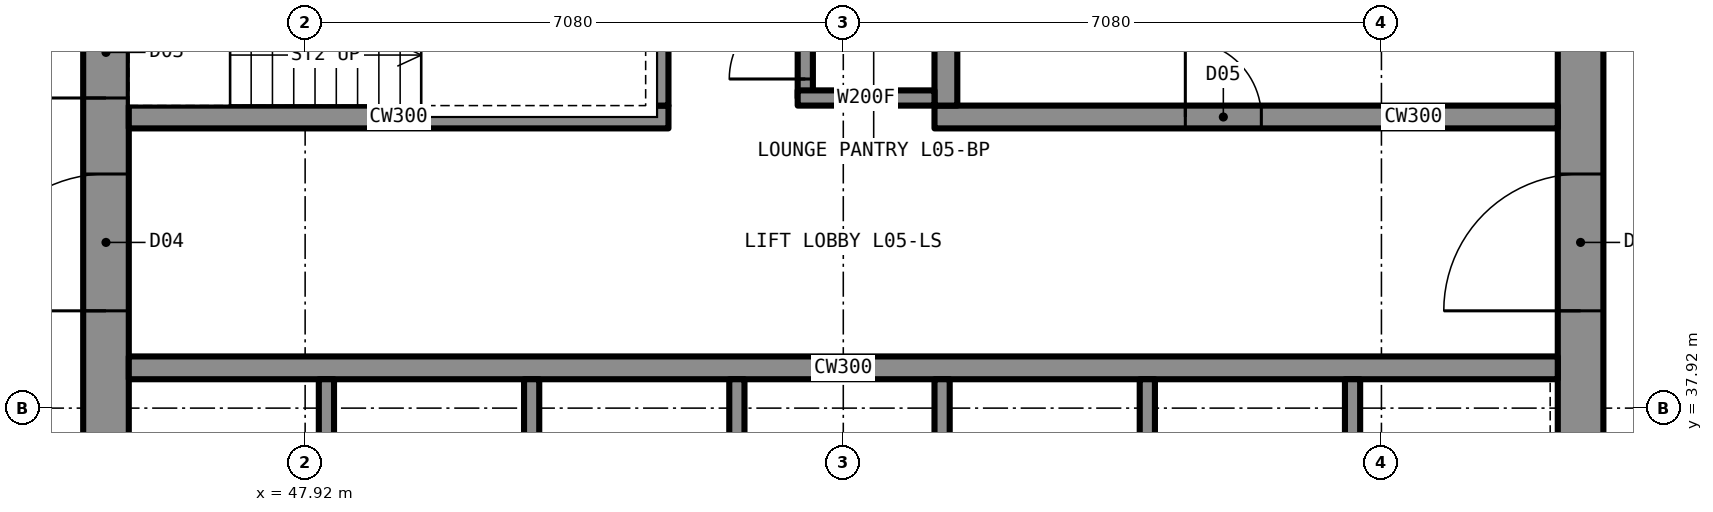
"""IFC4 building model, lengths in metres.
Left out: names, types, materials, properties, quantities, classifications, styles, units other than length and angle.
Written with IfcOpenShell. Run it as: python <this file> out.ifc"""

import sys

from ifc_helpers import new_model, si_unit, direction, frame, frame_2d, origin, place, context, subcontext, project, spatial, rectangle, extrude, element, fill, save


model = new_model("IFC4")
c1 = context("Model", 3, precision=1e-05, world=origin(), true_north=direction((0.0, 1.0)))
c2 = subcontext(c1, "Body", "Model", "MODEL_VIEW")
j1 = project(units=[si_unit("LENGTHUNIT", "METRE"), si_unit("PLANEANGLEUNIT", "RADIAN")], contexts=[c1])
p1 = place(None, origin())
s1 = spatial("IfcSite", under=j1, at=p1, CompositionType="ELEMENT")
p2 = place(p1, origin())
s2 = spatial("IfcBuilding", under=s1, at=p2, CompositionType="ELEMENT")
p3 = place(p2, frame((0.0, 0.0, 25.0)))
s3 = spatial("IfcBuildingStorey", under=s2, at=p3, CompositionType="ELEMENT", Elevation=25.0)
p4 = place(p3, frame((64.7, 35.6, 0.0), z_axis=(0.0, 0.0, 1.0), x_axis=(0.0, 1.0, 0.0)))
e1 = element("IfcWall", 1, at=p4, inside=s3, PredefinedType="SHEAR", context=c2, shape_type="SweptSolid", body=[
    extrude(rectangle(XDim=18.8, YDim=0.6, at=frame_2d((9.4, 0.0))), origin(), (0.0, 0.0, 1.0), 3.5),
])
p5 = place(p4, frame((13.4, 0.0, 0.0)))
e2 = element("IfcOpeningElement", 2, at=p5, cuts=e1, PredefinedType="OPENING", context=c2, shape_type="SweptSolid", body=[
    extrude(rectangle(XDim=1.8, YDim=2.2, at=frame_2d((0.9, 1.1))), frame((0.0, 0.31, 0.0), z_axis=(0.0, -1.0, 0.0), x_axis=(1.0, 0.0, 0.0)), (0.0, 0.0, 1.0), 0.62),
])
p6 = place(p4, frame((3.6, 0.0, 0.0)))
e3 = element("IfcOpeningElement", 3, at=p6, cuts=e1, PredefinedType="OPENING", context=c2, shape_type="SweptSolid", body=[
    extrude(rectangle(XDim=1.8, YDim=2.2, at=frame_2d((0.9, 1.1))), frame((0.0, 0.31, 0.0), z_axis=(0.0, -1.0, 0.0), x_axis=(1.0, 0.0, 0.0)), (0.0, 0.0, 1.0), 0.62),
])
p7 = place(p3, frame((45.3, 35.6, 0.0), z_axis=(0.0, 0.0, 1.0), x_axis=(0.0, 1.0, 0.0)))
e4 = element("IfcWall", 4, at=p7, inside=s3, PredefinedType="SHEAR", context=c2, shape_type="SweptSolid", body=[
    extrude(rectangle(XDim=18.8, YDim=0.6, at=frame_2d((9.4, 0.0))), origin(), (0.0, 0.0, 1.0), 3.5),
])
p8 = place(p7, frame((13.4, 0.0, 0.0)))
e5 = element("IfcOpeningElement", 5, at=p8, cuts=e4, PredefinedType="OPENING", context=c2, shape_type="SweptSolid", body=[
    extrude(rectangle(XDim=1.8, YDim=2.2, at=frame_2d((0.9, 1.1))), frame((0.0, 0.31, 0.0), z_axis=(0.0, -1.0, 0.0), x_axis=(1.0, 0.0, 0.0)), (0.0, 0.0, 1.0), 0.62),
])
p9 = place(p7, frame((3.6, 0.0, 0.0)))
e6 = element("IfcOpeningElement", 6, at=p9, cuts=e4, PredefinedType="OPENING", context=c2, shape_type="SweptSolid", body=[
    extrude(rectangle(XDim=1.8, YDim=2.2, at=frame_2d((0.9, 1.1))), frame((0.0, 0.31, 0.0), z_axis=(0.0, -1.0, 0.0), x_axis=(1.0, 0.0, 0.0)), (0.0, 0.0, 1.0), 0.62),
])
p10 = place(p7, frame((6.4, 0.0, 0.0)))
e7 = element("IfcOpeningElement", 7, at=p10, cuts=e4, PredefinedType="OPENING", context=c2, shape_type="SweptSolid", body=[
    extrude(rectangle(XDim=1.2, YDim=2.2, at=frame_2d((0.6, 1.1))), frame((0.0, 0.31, 0.0), z_axis=(0.0, -1.0, 0.0), x_axis=(1.0, 0.0, 0.0)), (0.0, 0.0, 1.0), 0.62),
])
p11 = place(p3, frame((45.6, 38.45, 0.0), z_axis=(0.0, 0.0, 1.0), x_axis=(1.0, 0.0, 0.0)))
e8 = element("IfcWall", 8, at=p11, inside=s3, PredefinedType="SHEAR", context=c2, shape_type="SweptSolid", body=[
    extrude(rectangle(XDim=18.8, YDim=0.3, at=frame_2d((9.4, 0.0))), origin(), (0.0, 0.0, 1.0), 3.5),
])
p12 = place(p3, frame((45.6, 41.75, 0.0), z_axis=(0.0, 0.0, 1.0), x_axis=(1.0, 0.0, 0.0)))
e9 = element("IfcWall", 9, at=p12, inside=s3, PredefinedType="SHEAR", context=c2, shape_type="SweptSolid", body=[
    extrude(rectangle(XDim=7.1, YDim=0.3, at=frame_2d((3.55, 0.0))), origin(), (0.0, 0.0, 1.0), 3.5),
])
p13 = place(p3, frame((56.2, 41.75, 0.0), z_axis=(0.0, 0.0, 1.0), x_axis=(1.0, 0.0, 0.0)))
e10 = element("IfcWall", 10, at=p13, inside=s3, PredefinedType="SHEAR", context=c2, shape_type="SweptSolid", body=[
    extrude(rectangle(XDim=8.2, YDim=0.3, at=frame_2d((4.1, 0.0))), origin(), (0.0, 0.0, 1.0), 3.5),
])
p14 = place(p13, frame((3.3, 0.0, 0.0)))
e11 = element("IfcOpeningElement", 11, at=p14, cuts=e10, PredefinedType="OPENING", context=c2, shape_type="SweptSolid", body=[
    extrude(rectangle(XDim=1.0, YDim=2.1, at=frame_2d((0.5, 1.05))), frame((0.0, 0.16, 0.0), z_axis=(0.0, -1.0, 0.0), x_axis=(1.0, 0.0, 0.0)), (0.0, 0.0, 1.0), 0.32),
])
p15 = place(p3, frame((52.55, 41.9, 0.0), z_axis=(0.0, 0.0, 1.0), x_axis=(0.0, 1.0, 0.0)))
e12 = element("IfcWall", 12, at=p15, inside=s3, PredefinedType="SHEAR", context=c2, shape_type="SweptSolid", body=[
    extrude(rectangle(XDim=6.2, YDim=0.3, at=frame_2d((3.1, 0.0))), origin(), (0.0, 0.0, 1.0), 3.5),
])
p16 = place(p15, frame((4.125, 0.0, 0.0)))
e13 = element("IfcOpeningElement", 13, at=p16, cuts=e12, PredefinedType="OPENING", context=c2, shape_type="SweptSolid", body=[
    extrude(rectangle(XDim=1.2, YDim=2.2, at=frame_2d((0.6, 1.1))), frame((0.0, 0.16, 0.0), z_axis=(0.0, -1.0, 0.0), x_axis=(1.0, 0.0, 0.0)), (0.0, 0.0, 1.0), 0.32),
])
p17 = place(p3, frame((56.35, 41.9, 0.0), z_axis=(0.0, 0.0, 1.0), x_axis=(0.0, 1.0, 0.0)))
e14 = element("IfcWall", 14, at=p17, inside=s3, PredefinedType="SHEAR", context=c2, shape_type="SweptSolid", body=[
    extrude(rectangle(XDim=9.5, YDim=0.3, at=frame_2d((4.75, 0.0))), origin(), (0.0, 0.0, 1.0), 3.5),
])
p18 = place(p17, frame((7.1, 0.0, 0.0)))
e15 = element("IfcOpeningElement", 15, at=p18, cuts=e14, PredefinedType="OPENING", context=c2, shape_type="SweptSolid", body=[
    extrude(rectangle(XDim=1.8, YDim=2.2, at=frame_2d((0.9, 1.1))), frame((0.0, 0.16, 0.0), z_axis=(0.0, -1.0, 0.0), x_axis=(1.0, 0.0, 0.0)), (0.0, 0.0, 1.0), 0.32),
])
p19 = place(p3, frame((54.5, 42.0, 0.0), z_axis=(0.0, 0.0, 1.0), x_axis=(0.0, 1.0, 0.0)))
e16 = element("IfcWall", 16, at=p19, inside=s3, PredefinedType="PARTITIONING", context=c2, shape_type="SweptSolid", body=[
    extrude(rectangle(XDim=1.5, YDim=0.2, at=frame_2d((0.75, 0.0))), origin(), (0.0, 0.0, 1.0), 3.33),
])
p20 = place(p19, frame((0.25, 0.0, 0.0)))
e17 = element("IfcOpeningElement", 17, at=p20, cuts=e16, PredefinedType="OPENING", context=c2, shape_type="SweptSolid", body=[
    extrude(rectangle(XDim=1.0, YDim=2.1, at=frame_2d((0.5, 1.05))), frame((0.0, 0.11, 0.0), z_axis=(0.0, -1.0, 0.0), x_axis=(1.0, 0.0, 0.0)), (0.0, 0.0, 1.0), 0.22),
])
p21 = place(p3, frame((54.4, 42.0, 0.0), z_axis=(0.0, 0.0, 1.0), x_axis=(1.0, 0.0, 0.0)))
e18 = element("IfcWall", 18, at=p21, inside=s3, PredefinedType="PARTITIONING", context=c2, shape_type="SweptSolid", body=[
    extrude(rectangle(XDim=1.8, YDim=0.2, at=frame_2d((0.9, 0.0))), origin(), (0.0, 0.0, 1.0), 3.33),
])
for number, where, z_axis, x_axis in (
    (19, (48.2, 35.6, 0.0), (0.0, 0.0, 1.0), (0.0, 1.0, 0.0)),
    (20, (50.9, 35.6, 0.0), (0.0, 0.0, 1.0), (0.0, 1.0, 0.0)),
    (21, (53.6, 35.6, 0.0), (0.0, 0.0, 1.0), (0.0, 1.0, 0.0)),
    (22, (56.3, 35.6, 0.0), (0.0, 0.0, 1.0), (0.0, 1.0, 0.0)),
    (23, (59.0, 35.6, 0.0), (0.0, 0.0, 1.0), (0.0, 1.0, 0.0)),
    (24, (61.7, 35.6, 0.0), (0.0, 0.0, 1.0), (0.0, 1.0, 0.0)),
):
    element("IfcWall", number, at=place(p3, frame(where, z_axis=z_axis, x_axis=x_axis)), inside=s3, PredefinedType="PARTITIONING", context=c2, shape_type="SweptSolid", body=[
        extrude(rectangle(XDim=2.7, YDim=0.2, at=frame_2d((1.35, 0.0))), origin(), (0.0, 0.0, 1.0), 3.33),
    ])
p22 = place(p20, origin())
e25 = element("IfcDoor", 25, at=p22, inside=s3, OperationType="SINGLE_SWING_LEFT", PredefinedType="DOOR", context=c2, shape_type="SweptSolid", body=[
    extrude(rectangle(XDim=1.0, YDim=2.1, at=frame_2d((0.5, 1.05))), frame((0.0, 0.025, 0.0), z_axis=(0.0, -1.0, 0.0), x_axis=(1.0, 0.0, 0.0)), (0.0, 0.0, 1.0), 0.05),
])
fill(e17, e25)
p23 = place(p9, origin())
e26 = element("IfcDoor", 26, at=p23, inside=s3, OperationType="DOUBLE_DOOR_SINGLE_SWING", PredefinedType="DOOR", context=c2, shape_type="SweptSolid", body=[
    extrude(rectangle(XDim=1.8, YDim=2.2, at=frame_2d((0.9, 1.1))), frame((0.0, 0.025, 0.0), z_axis=(0.0, -1.0, 0.0), x_axis=(1.0, 0.0, 0.0)), (0.0, 0.0, 1.0), 0.05),
])
fill(e6, e26)
p24 = place(p6, origin())
e27 = element("IfcDoor", 27, at=p24, inside=s3, OperationType="DOUBLE_DOOR_SINGLE_SWING", PredefinedType="DOOR", context=c2, shape_type="SweptSolid", body=[
    extrude(rectangle(XDim=1.8, YDim=2.2, at=frame_2d((0.9, 1.1))), frame((0.0, 0.025, 0.0), z_axis=(0.0, -1.0, 0.0), x_axis=(1.0, 0.0, 0.0)), (0.0, 0.0, 1.0), 0.05),
])
fill(e3, e27)
p25 = place(p10, origin())
e28 = element("IfcDoor", 28, at=p25, inside=s3, OperationType="SINGLE_SWING_LEFT", PredefinedType="DOOR", context=c2, shape_type="SweptSolid", body=[
    extrude(rectangle(XDim=1.2, YDim=2.2, at=frame_2d((0.6, 1.1))), frame((0.0, 0.025, 0.0), z_axis=(0.0, -1.0, 0.0), x_axis=(1.0, 0.0, 0.0)), (0.0, 0.0, 1.0), 0.05),
])
fill(e7, e28)
p26 = place(p14, origin())
e29 = element("IfcDoor", 29, at=p26, inside=s3, OperationType="SINGLE_SWING_LEFT", PredefinedType="DOOR", context=c2, shape_type="SweptSolid", body=[
    extrude(rectangle(XDim=1.0, YDim=2.1, at=frame_2d((0.5, 1.05))), frame((0.0, 0.025, 0.0), z_axis=(0.0, -1.0, 0.0), x_axis=(1.0, 0.0, 0.0)), (0.0, 0.0, 1.0), 0.05),
])
fill(e11, e29)
save(model, sys.argv[1])
